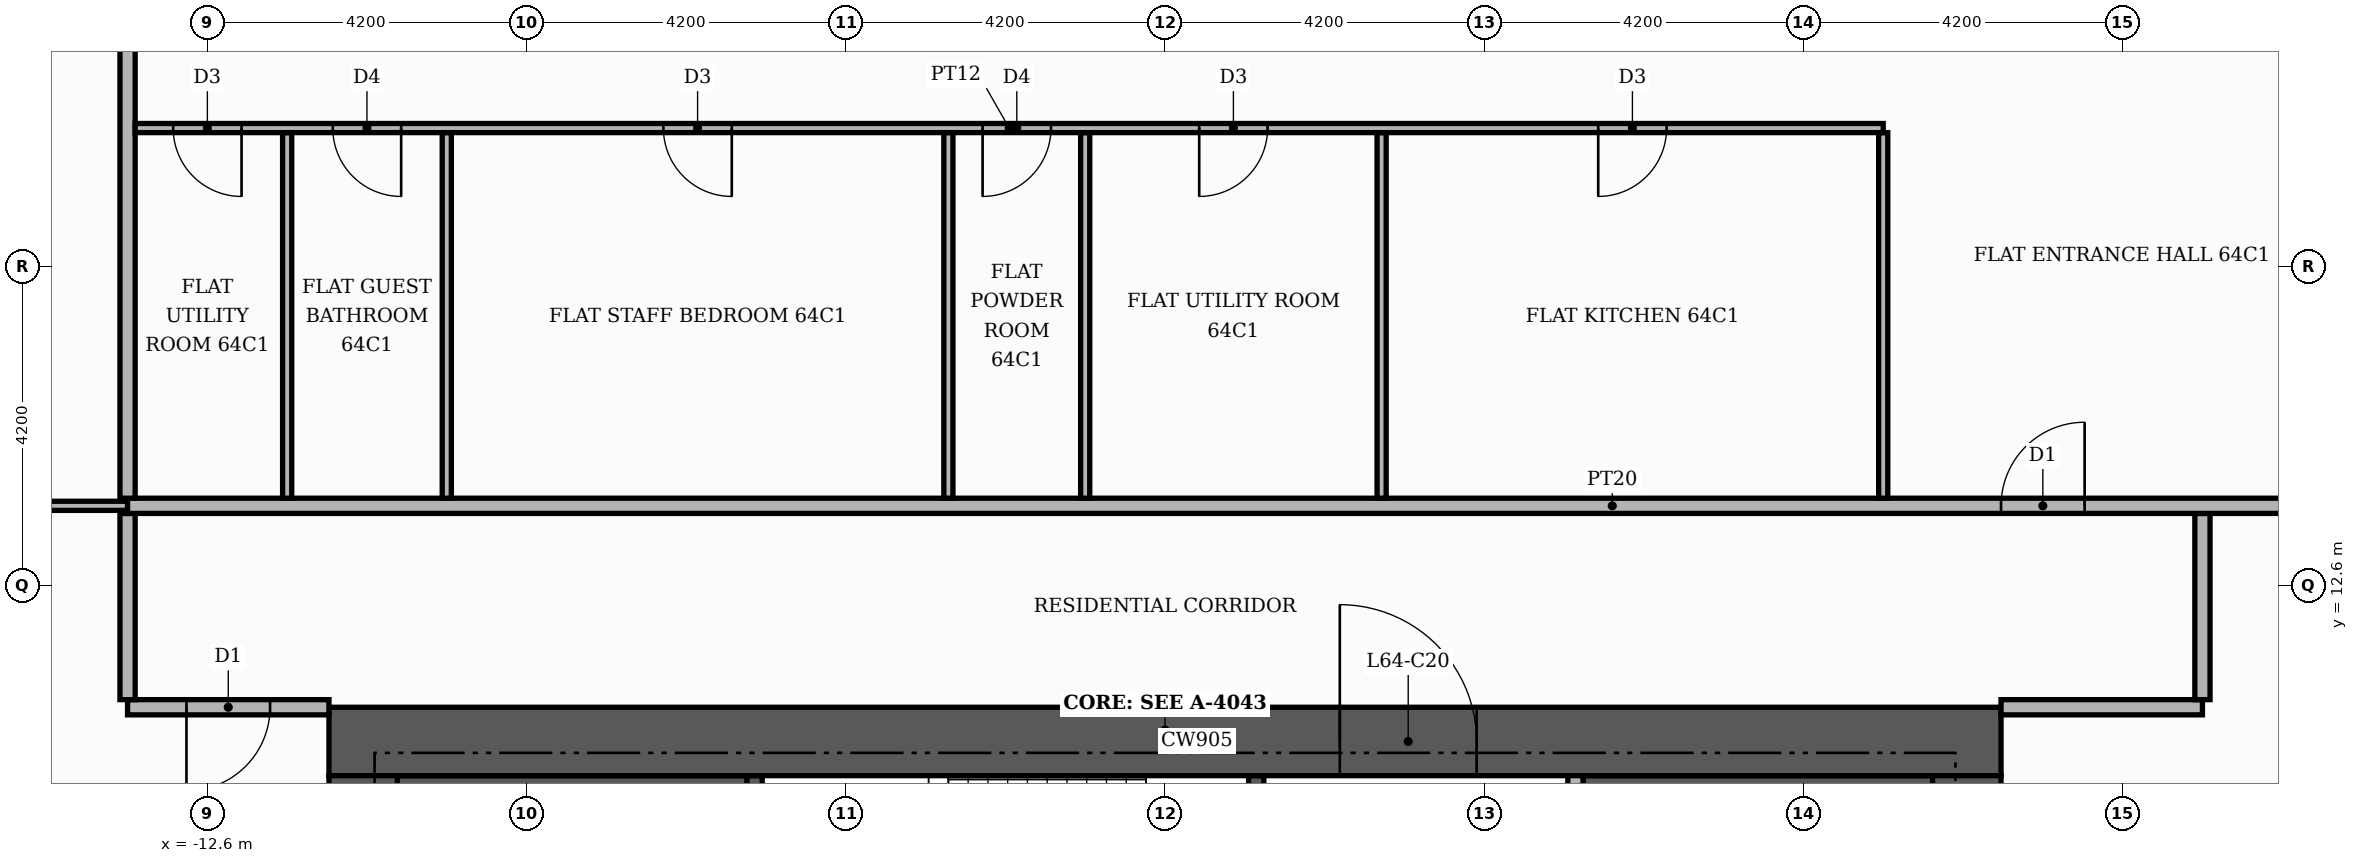
"""IFC4 building model, lengths in metres.
Left out: names, types, materials, properties, quantities, classifications, styles, units other than length and angle.
Written with IfcOpenShell. Run it as: python <this file> out.ifc"""

import sys

from ifc_helpers import new_model, si_unit, direction, frame, frame_2d, origin, place, context, subcontext, project, spatial, rectangle, extrude, element, fill, save


model = new_model("IFC4")
c1 = context("Model", 3, precision=1e-05, world=origin(), true_north=direction((0.0, 1.0)))
c2 = subcontext(c1, "Body", "Model", "MODEL_VIEW")
j1 = project(units=[si_unit("LENGTHUNIT", "METRE"), si_unit("PLANEANGLEUNIT", "RADIAN")], contexts=[c1])
p1 = place(None, origin())
s1 = spatial("IfcSite", under=j1, at=p1, CompositionType="ELEMENT")
p2 = place(p1, origin())
s2 = spatial("IfcBuilding", under=s1, at=p2, CompositionType="ELEMENT")
p3 = place(p2, frame((0.0, 0.0, 267.9)))
s3 = spatial("IfcBuildingStorey", under=s2, at=p3, CompositionType="ELEMENT", Elevation=267.9)
for number, where, z_axis, x_axis in (
    (1, (-10.1, 9.15, 0.0), (0.0, 0.0, 1.0), (1.0, 0.0, 0.0)),
    (2, (5.5, 9.15, 0.0), (0.0, 0.0, 1.0), (1.0, 0.0, 0.0)),
):
    element("IfcWall", number, at=place(p3, frame(where, z_axis=z_axis, x_axis=x_axis)), inside=s3, PredefinedType="SHEAR", context=c2, shape_type="SweptSolid", body=[
        extrude(rectangle(XDim=4.6, YDim=1.9, at=frame_2d((2.3, 0.0))), origin(), (0.0, 0.0, 1.0), 3.48),
    ])
p4 = place(p3, frame((-5.4, 7.25, 0.0), z_axis=(0.0, 0.0, 1.0), x_axis=(0.0, 1.0, 0.0)))
e3 = element("IfcWall", 3, at=p4, inside=s3, PredefinedType="SHEAR", context=c2, shape_type="SweptSolid", body=[
    extrude(rectangle(XDim=2.85, YDim=0.2, at=frame_2d((1.425, 0.0))), origin(), (0.0, 0.0, 1.0), 3.48),
])
p5 = place(p3, frame((1.2, 7.25, 0.0), z_axis=(0.0, 0.0, 1.0), x_axis=(0.0, 1.0, 0.0)))
e4 = element("IfcWall", 4, at=p5, inside=s3, PredefinedType="SHEAR", context=c2, shape_type="SweptSolid", body=[
    extrude(rectangle(XDim=2.85, YDim=0.2, at=frame_2d((1.425, 0.0))), origin(), (0.0, 0.0, 1.0), 3.48),
])
p6 = place(p5, frame((0.85, 0.0, 0.0)))
e5 = element("IfcOpeningElement", 5, at=p6, cuts=e4, PredefinedType="OPENING", context=c2, shape_type="SweptSolid", body=[
    extrude(rectangle(XDim=1.0, YDim=2.1, at=frame_2d((0.5, 1.05))), frame((0.0, 0.11, 0.0), z_axis=(0.0, -1.0, 0.0), x_axis=(1.0, 0.0, 0.0)), (0.0, 0.0, 1.0), 0.22),
])
p7 = place(p3, frame((-11.0, 10.55, 0.0), z_axis=(0.0, 0.0, 1.0), x_axis=(1.0, 0.0, 0.0)))
e6 = element("IfcWall", 6, at=p7, inside=s3, PredefinedType="SHEAR", context=c2, shape_type="SweptSolid", body=[
    extrude(rectangle(XDim=22.0, YDim=0.9, at=frame_2d((11.0, 0.0))), origin(), (0.0, 0.0, 1.0), 3.48),
])
p8 = place(p7, frame((13.3, 0.0, 0.0)))
e7 = element("IfcOpeningElement", 7, at=p8, cuts=e6, PredefinedType="OPENING", context=c2, shape_type="SweptSolid", body=[
    extrude(rectangle(XDim=1.8, YDim=2.2, at=frame_2d((0.9, 1.1))), frame((0.0, 0.46, 0.0), z_axis=(0.0, -1.0, 0.0), x_axis=(1.0, 0.0, 0.0)), (0.0, 0.0, 1.0), 0.92),
])
for number, where, z_axis, x_axis in (
    (8, (-10.55, -10.1, 0.0), (0.0, 0.0, 1.0), (0.0, 1.0, 0.0)),
    (9, (10.55, -10.1, 0.0), (0.0, 0.0, 1.0), (0.0, 1.0, 0.0)),
):
    element("IfcWall", number, at=place(p3, frame(where, z_axis=z_axis, x_axis=x_axis)), inside=s3, PredefinedType="SHEAR", context=c2, shape_type="SweptSolid", body=[
        extrude(rectangle(XDim=20.2, YDim=0.9, at=frame_2d((10.1, 0.0))), origin(), (0.0, 0.0, 1.0), 3.48),
    ])
p9 = place(p3, frame((5.4, 5.5, 0.0), z_axis=(0.0, 0.0, 1.0), x_axis=(0.0, 1.0, 0.0)))
e10 = element("IfcWall", 10, at=p9, inside=s3, PredefinedType="PARTITIONING", context=c2, shape_type="SweptSolid", body=[
    extrude(rectangle(XDim=4.6, YDim=0.2, at=frame_2d((2.3, 0.0))), origin(), (0.0, 0.0, 1.0), 3.48),
])
p10 = place(p9, frame((0.25, 0.0, 0.0)))
e11 = element("IfcOpeningElement", 11, at=p10, cuts=e10, PredefinedType="OPENING", context=c2, shape_type="SweptSolid", body=[
    extrude(rectangle(XDim=1.0, YDim=2.1, at=frame_2d((0.5, 1.05))), frame((0.0, 0.11, 0.0), z_axis=(0.0, -1.0, 0.0), x_axis=(1.0, 0.0, 0.0)), (0.0, 0.0, 1.0), 0.22),
])
p11 = place(p3, frame((-13.65, 11.0, 0.0), z_axis=(0.0, 0.0, 1.0), x_axis=(1.0, 0.0, 0.0)))
e12 = element("IfcWall", 12, at=p11, inside=s3, PredefinedType="PARTITIONING", context=c2, shape_type="SweptSolid", body=[
    extrude(rectangle(XDim=2.65, YDim=0.2, at=frame_2d((1.325, 0.0))), origin(), (0.0, 0.0, 1.0), 3.48),
])
p12 = place(p11, frame((0.775, 0.0, 0.0)))
e13 = element("IfcOpeningElement", 13, at=p12, cuts=e12, PredefinedType="OPENING", context=c2, shape_type="SweptSolid", body=[
    extrude(rectangle(XDim=1.1, YDim=2.4, at=frame_2d((0.55, 1.2))), frame((0.0, 0.11, 0.0), z_axis=(0.0, -1.0, 0.0), x_axis=(1.0, 0.0, 0.0)), (0.0, 0.0, 1.0), 0.22),
])
p13 = place(p3, frame((11.0, 11.0, 0.0), z_axis=(0.0, 0.0, 1.0), x_axis=(1.0, 0.0, 0.0)))
e14 = element("IfcWall", 14, at=p13, inside=s3, PredefinedType="PARTITIONING", context=c2, shape_type="SweptSolid", body=[
    extrude(rectangle(XDim=2.65, YDim=0.2, at=frame_2d((1.325, 0.0))), origin(), (0.0, 0.0, 1.0), 3.48),
])
for number, where, z_axis, x_axis in (
    (15, (-13.65, 11.1, 0.0), (0.0, 0.0, 1.0), (0.0, 1.0, 0.0)),
    (16, (13.65, 11.1, 0.0), (0.0, 0.0, 1.0), (0.0, 1.0, 0.0)),
):
    element("IfcWall", number, at=place(p3, frame(where, z_axis=z_axis, x_axis=x_axis)), inside=s3, PredefinedType="PARTITIONING", context=c2, shape_type="SweptSolid", body=[
        extrude(rectangle(XDim=2.45, YDim=0.2, at=frame_2d((1.225, 0.0))), origin(), (0.0, 0.0, 1.0), 3.48),
    ])
p14 = place(p3, frame((-20.42, 13.65, 0.0), z_axis=(0.0, 0.0, 1.0), x_axis=(1.0, 0.0, 0.0)))
e17 = element("IfcWall", 17, at=p14, inside=s3, PredefinedType="PARTITIONING", context=c2, shape_type="SweptSolid", body=[
    extrude(rectangle(XDim=6.77, YDim=0.12, at=frame_2d((3.385, 0.0))), origin(), (0.0, 0.0, 1.0), 3.48),
])
p15 = place(p14, frame((2.885, 0.0, 0.0)))
e18 = element("IfcOpeningElement", 18, at=p15, cuts=e17, PredefinedType="OPENING", context=c2, shape_type="SweptSolid", body=[
    extrude(rectangle(XDim=1.0, YDim=2.1, at=frame_2d((0.5, 1.05))), frame((0.0, 0.07, 0.0), z_axis=(0.0, -1.0, 0.0), x_axis=(1.0, 0.0, 0.0)), (0.0, 0.0, 1.0), 0.14),
])
p16 = place(p3, frame((-13.65, 13.65, 0.0), z_axis=(0.0, 0.0, 1.0), x_axis=(1.0, 0.0, 0.0)))
e19 = element("IfcWall", 19, at=p16, inside=s3, PredefinedType="PARTITIONING", context=c2, shape_type="SweptSolid", body=[
    extrude(rectangle(XDim=39.07, YDim=0.2, at=frame_2d((19.535, 0.0))), origin(), (0.0, 0.0, 1.0), 3.48),
])
p17 = place(p16, frame((24.65, 0.0, 0.0)))
e20 = element("IfcOpeningElement", 20, at=p17, cuts=e19, PredefinedType="OPENING", context=c2, shape_type="SweptSolid", body=[
    extrude(rectangle(XDim=1.1, YDim=2.4, at=frame_2d((0.55, 1.2))), frame((0.0, 0.11, 0.0), z_axis=(0.0, -1.0, 0.0), x_axis=(1.0, 0.0, 0.0)), (0.0, 0.0, 1.0), 0.22),
])
p18 = place(p3, frame((-13.65, 13.75, 0.0), z_axis=(0.0, 0.0, 1.0), x_axis=(0.0, 1.0, 0.0)))
e21 = element("IfcWall", 21, at=p18, inside=s3, PredefinedType="PARTITIONING", context=c2, shape_type="SweptSolid", body=[
    extrude(rectangle(XDim=11.67, YDim=0.2, at=frame_2d((5.835, 0.0))), origin(), (0.0, 0.0, 1.0), 3.48),
])
for number, where, z_axis, x_axis in (
    (22, (-11.55, 13.75, 0.0), (0.0, 0.0, 1.0), (0.0, 1.0, 0.0)),
    (23, (-9.45, 13.75, 0.0), (0.0, 0.0, 1.0), (0.0, 1.0, 0.0)),
    (24, (-2.85, 13.75, 0.0), (0.0, 0.0, 1.0), (0.0, 1.0, 0.0)),
    (25, (-1.05, 13.75, 0.0), (0.0, 0.0, 1.0), (0.0, 1.0, 0.0)),
    (26, (2.85, 13.75, 0.0), (0.0, 0.0, 1.0), (0.0, 1.0, 0.0)),
    (27, (9.45, 13.75, 0.0), (0.0, 0.0, 1.0), (0.0, 1.0, 0.0)),
):
    element("IfcWall", number, at=place(p3, frame(where, z_axis=z_axis, x_axis=x_axis)), inside=s3, PredefinedType="PARTITIONING", context=c2, shape_type="SweptSolid", body=[
        extrude(rectangle(XDim=4.81, YDim=0.12, at=frame_2d((2.405, 0.0))), origin(), (0.0, 0.0, 1.0), 3.48),
    ])
p19 = place(p3, frame((-13.55, 18.62, 0.0), z_axis=(0.0, 0.0, 1.0), x_axis=(1.0, 0.0, 0.0)))
e28 = element("IfcWall", 28, at=p19, inside=s3, PredefinedType="PARTITIONING", context=c2, shape_type="SweptSolid", body=[
    extrude(rectangle(XDim=23.0, YDim=0.12, at=frame_2d((11.5, 0.0))), origin(), (0.0, 0.0, 1.0), 3.48),
])
p20 = place(p19, frame((19.25, 0.0, 0.0)))
e29 = element("IfcOpeningElement", 29, at=p20, cuts=e28, PredefinedType="OPENING", context=c2, shape_type="SweptSolid", body=[
    extrude(rectangle(XDim=0.9, YDim=2.1, at=frame_2d((0.45, 1.05))), frame((0.0, 0.07, 0.0), z_axis=(0.0, -1.0, 0.0), x_axis=(1.0, 0.0, 0.0)), (0.0, 0.0, 1.0), 0.14),
])
p21 = place(p19, frame((14.0, 0.0, 0.0)))
e30 = element("IfcOpeningElement", 30, at=p21, cuts=e28, PredefinedType="OPENING", context=c2, shape_type="SweptSolid", body=[
    extrude(rectangle(XDim=0.9, YDim=2.1, at=frame_2d((0.45, 1.05))), frame((0.0, 0.07, 0.0), z_axis=(0.0, -1.0, 0.0), x_axis=(1.0, 0.0, 0.0)), (0.0, 0.0, 1.0), 0.14),
])
p22 = place(p19, frame((11.15, 0.0, 0.0)))
e31 = element("IfcOpeningElement", 31, at=p22, cuts=e28, PredefinedType="OPENING", context=c2, shape_type="SweptSolid", body=[
    extrude(rectangle(XDim=0.9, YDim=2.1, at=frame_2d((0.45, 1.05))), frame((0.0, 0.07, 0.0), z_axis=(0.0, -1.0, 0.0), x_axis=(1.0, 0.0, 0.0)), (0.0, 0.0, 1.0), 0.14),
])
p23 = place(p19, frame((6.95, 0.0, 0.0)))
e32 = element("IfcOpeningElement", 32, at=p23, cuts=e28, PredefinedType="OPENING", context=c2, shape_type="SweptSolid", body=[
    extrude(rectangle(XDim=0.9, YDim=2.1, at=frame_2d((0.45, 1.05))), frame((0.0, 0.07, 0.0), z_axis=(0.0, -1.0, 0.0), x_axis=(1.0, 0.0, 0.0)), (0.0, 0.0, 1.0), 0.14),
])
p24 = place(p19, frame((2.6, 0.0, 0.0)))
e33 = element("IfcOpeningElement", 33, at=p24, cuts=e28, PredefinedType="OPENING", context=c2, shape_type="SweptSolid", body=[
    extrude(rectangle(XDim=0.9, YDim=2.1, at=frame_2d((0.45, 1.05))), frame((0.0, 0.07, 0.0), z_axis=(0.0, -1.0, 0.0), x_axis=(1.0, 0.0, 0.0)), (0.0, 0.0, 1.0), 0.14),
])
p25 = place(p19, frame((0.5, 0.0, 0.0)))
e34 = element("IfcOpeningElement", 34, at=p25, cuts=e28, PredefinedType="OPENING", context=c2, shape_type="SweptSolid", body=[
    extrude(rectangle(XDim=0.9, YDim=2.1, at=frame_2d((0.45, 1.05))), frame((0.0, 0.07, 0.0), z_axis=(0.0, -1.0, 0.0), x_axis=(1.0, 0.0, 0.0)), (0.0, 0.0, 1.0), 0.14),
])
p26 = place(p8, origin())
e35 = element("IfcDoor", 35, at=p26, inside=s3, OperationType="DOUBLE_DOOR_SINGLE_SWING", PredefinedType="DOOR", context=c2, shape_type="SweptSolid", body=[
    extrude(rectangle(XDim=1.8, YDim=2.2, at=frame_2d((0.9, 1.1))), frame((0.0, 0.025, 0.0), z_axis=(0.0, -1.0, 0.0), x_axis=(1.0, 0.0, 0.0)), (0.0, 0.0, 1.0), 0.05),
])
fill(e7, e35)
p27 = place(p17, origin())
e36 = element("IfcDoor", 36, at=p27, inside=s3, OperationType="SINGLE_SWING_RIGHT", PredefinedType="DOOR", context=c2, shape_type="SweptSolid", body=[
    extrude(rectangle(XDim=1.1, YDim=2.4, at=frame_2d((0.55, 1.2))), frame((0.0, 0.025, 0.0), z_axis=(0.0, -1.0, 0.0), x_axis=(1.0, 0.0, 0.0)), (0.0, 0.0, 1.0), 0.05),
])
fill(e20, e36)
p28 = place(p20, frame((0.9, 0.0, 0.0), z_axis=(0.0, 0.0, 1.0), x_axis=(-1.0, 0.0, 0.0)))
e37 = element("IfcDoor", 37, at=p28, inside=s3, OperationType="SINGLE_SWING_LEFT", PredefinedType="DOOR", context=c2, shape_type="SweptSolid", body=[
    extrude(rectangle(XDim=0.9, YDim=2.1, at=frame_2d((0.45, 1.05))), frame((0.0, 0.025, 0.0), z_axis=(0.0, -1.0, 0.0), x_axis=(1.0, 0.0, 0.0)), (0.0, 0.0, 1.0), 0.05),
])
fill(e29, e37)
p29 = place(p21, frame((0.9, 0.0, 0.0), z_axis=(0.0, 0.0, 1.0), x_axis=(-1.0, 0.0, 0.0)))
e38 = element("IfcDoor", 38, at=p29, inside=s3, OperationType="SINGLE_SWING_LEFT", PredefinedType="DOOR", context=c2, shape_type="SweptSolid", body=[
    extrude(rectangle(XDim=0.9, YDim=2.1, at=frame_2d((0.45, 1.05))), frame((0.0, 0.025, 0.0), z_axis=(0.0, -1.0, 0.0), x_axis=(1.0, 0.0, 0.0)), (0.0, 0.0, 1.0), 0.05),
])
fill(e30, e38)
p30 = place(p22, frame((0.9, 0.0, 0.0), z_axis=(0.0, 0.0, 1.0), x_axis=(-1.0, 0.0, 0.0)))
e39 = element("IfcDoor", 39, at=p30, inside=s3, OperationType="SINGLE_SWING_LEFT", PredefinedType="DOOR", context=c2, shape_type="SweptSolid", body=[
    extrude(rectangle(XDim=0.9, YDim=2.1, at=frame_2d((0.45, 1.05))), frame((0.0, 0.025, 0.0), z_axis=(0.0, -1.0, 0.0), x_axis=(1.0, 0.0, 0.0)), (0.0, 0.0, 1.0), 0.05),
])
fill(e31, e39)
p31 = place(p23, frame((0.9, 0.0, 0.0), z_axis=(0.0, 0.0, 1.0), x_axis=(-1.0, 0.0, 0.0)))
e40 = element("IfcDoor", 40, at=p31, inside=s3, OperationType="SINGLE_SWING_RIGHT", PredefinedType="DOOR", context=c2, shape_type="SweptSolid", body=[
    extrude(rectangle(XDim=0.9, YDim=2.1, at=frame_2d((0.45, 1.05))), frame((0.0, 0.025, 0.0), z_axis=(0.0, -1.0, 0.0), x_axis=(1.0, 0.0, 0.0)), (0.0, 0.0, 1.0), 0.05),
])
fill(e32, e40)
p32 = place(p24, frame((0.9, 0.0, 0.0), z_axis=(0.0, 0.0, 1.0), x_axis=(-1.0, 0.0, 0.0)))
e41 = element("IfcDoor", 41, at=p32, inside=s3, OperationType="SINGLE_SWING_RIGHT", PredefinedType="DOOR", context=c2, shape_type="SweptSolid", body=[
    extrude(rectangle(XDim=0.9, YDim=2.1, at=frame_2d((0.45, 1.05))), frame((0.0, 0.025, 0.0), z_axis=(0.0, -1.0, 0.0), x_axis=(1.0, 0.0, 0.0)), (0.0, 0.0, 1.0), 0.05),
])
fill(e33, e41)
p33 = place(p25, frame((0.9, 0.0, 0.0), z_axis=(0.0, 0.0, 1.0), x_axis=(-1.0, 0.0, 0.0)))
e42 = element("IfcDoor", 42, at=p33, inside=s3, OperationType="SINGLE_SWING_RIGHT", PredefinedType="DOOR", context=c2, shape_type="SweptSolid", body=[
    extrude(rectangle(XDim=0.9, YDim=2.1, at=frame_2d((0.45, 1.05))), frame((0.0, 0.025, 0.0), z_axis=(0.0, -1.0, 0.0), x_axis=(1.0, 0.0, 0.0)), (0.0, 0.0, 1.0), 0.05),
])
fill(e34, e42)
p34 = place(p12, frame((1.1, 0.0, 0.0), z_axis=(0.0, 0.0, 1.0), x_axis=(-1.0, 0.0, 0.0)))
e43 = element("IfcDoor", 43, at=p34, inside=s3, OperationType="SINGLE_SWING_LEFT", PredefinedType="DOOR", context=c2, shape_type="SweptSolid", body=[
    extrude(rectangle(XDim=1.1, YDim=2.4, at=frame_2d((0.55, 1.2))), frame((0.0, 0.025, 0.0), z_axis=(0.0, -1.0, 0.0), x_axis=(1.0, 0.0, 0.0)), (0.0, 0.0, 1.0), 0.05),
])
fill(e13, e43)
save(model, sys.argv[1])
